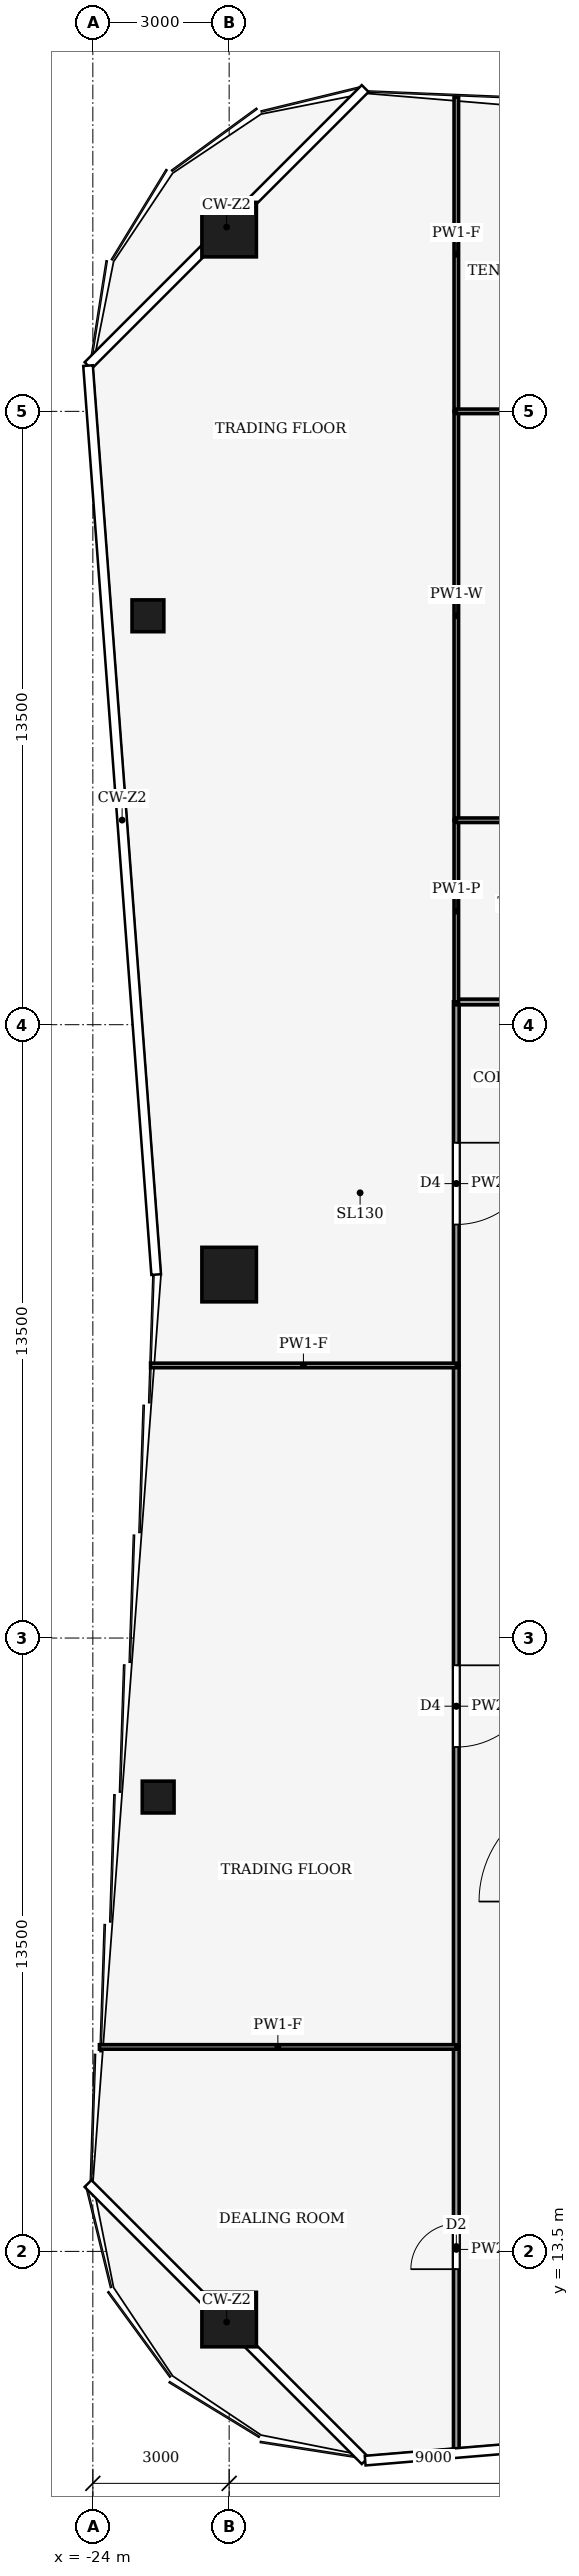
"""IFC4 building model, lengths in metres.
Left out: names, types, materials, properties, quantities, classifications, styles, units other than length and angle.
Written with IfcOpenShell. Run it as: python <this file> out.ifc"""

import sys

from ifc_helpers import new_model, si_unit, direction, frame, frame_2d, origin, origin_2d, place, context, subcontext, project, spatial, rectangle, hollow_rectangle, extrude, element, fill, save


model = new_model("IFC4")
c1 = context("Model", 3, precision=1e-05, world=origin(), true_north=direction((0.0, 1.0)))
c2 = subcontext(c1, "Body", "Model", "MODEL_VIEW")
j1 = project(units=[si_unit("LENGTHUNIT", "METRE"), si_unit("PLANEANGLEUNIT", "RADIAN")], contexts=[c1])
p1 = place(None, origin())
s1 = spatial("IfcSite", under=j1, at=p1, CompositionType="ELEMENT")
p2 = place(p1, origin())
s2 = spatial("IfcBuilding", under=s1, at=p2, CompositionType="ELEMENT")
p3 = place(p2, frame((0.0, 0.0, 142.0)))
s3 = spatial("IfcBuildingStorey", under=s2, at=p3, CompositionType="ELEMENT", Elevation=142.0)
for number, where, z_axis, x_axis in (
    (1, (-21.0, 58.0, 0.0), (0.0, 0.0, 1.0), (1.0, 0.0, 0.0)),
    (2, (-21.0, 12.0, 0.0), (0.0, 0.0, 1.0), (1.0, 0.0, 0.0)),
    (3, (-21.0, 35.0, 0.0), (0.0, 0.0, 1.0), (1.0, 0.0, 0.0)),
):
    element("IfcColumn", number, at=place(p3, frame(where, z_axis=z_axis, x_axis=x_axis)), inside=s3, PredefinedType="COLUMN", context=c2, shape_type="SweptSolid", body=[
        extrude(hollow_rectangle(XDim=1.2, YDim=1.2, WallThickness=0.07, at=origin_2d()), origin(), (0.0, 0.0, 1.0), 4.0),
    ])
for number, where, z_axis, x_axis in (
    (4, (-22.562, 23.5, 0.0), (0.0, 0.0, 1.0), (1.0, 0.0, 0.0)),
    (5, (-22.788, 49.5, 0.0), (0.0, 0.0, 1.0), (1.0, 0.0, 0.0)),
):
    element("IfcColumn", number, at=place(p3, frame(where, z_axis=z_axis, x_axis=x_axis)), inside=s3, PredefinedType="COLUMN", context=c2, shape_type="SweptSolid", body=[
        extrude(hollow_rectangle(XDim=0.7, YDim=0.7, WallThickness=0.03, at=origin_2d()), origin(), (0.0, 0.0, 1.0), 4.0),
    ])
p4 = place(p3, frame((-16.0, 9.087, 0.0), z_axis=(0.0, 0.0, 1.0), x_axis=(0.0, 1.0, 0.0)))
e6 = element("IfcWall", 6, at=p4, inside=s3, PredefinedType="PARTITIONING", context=c2, shape_type="SweptSolid", body=[
    extrude(rectangle(XDim=8.913, YDim=0.125, at=frame_2d((4.457, 0.0))), origin(), (0.0, 0.0, 1.0), 3.04),
])
p5 = place(p4, frame((4.022, 0.0, 0.0)))
e7 = element("IfcOpeningElement", 7, at=p5, cuts=e6, PredefinedType="OPENING", context=c2, shape_type="SweptSolid", body=[
    extrude(rectangle(XDim=1.0, YDim=2.1, at=frame_2d((0.5, 1.05))), frame((0.0, 0.073, 0.0), z_axis=(0.0, -1.0, 0.0), x_axis=(1.0, 0.0, 0.0)), (0.0, 0.0, 1.0), 0.145),
])
p6 = place(p3, frame((-16.0, 33.0, 0.0), z_axis=(0.0, 0.0, 1.0), x_axis=(0.0, -1.0, 0.0)))
e8 = element("IfcWall", 8, at=p6, inside=s3, PredefinedType="PARTITIONING", context=c2, shape_type="SweptSolid", body=[
    extrude(rectangle(XDim=15.0, YDim=0.125, at=frame_2d((7.5, 0.0))), origin(), (0.0, 0.0, 1.0), 3.48),
])
p7 = place(p6, frame((6.6, 0.0, 0.0)))
e9 = element("IfcOpeningElement", 9, at=p7, cuts=e8, PredefinedType="OPENING", context=c2, shape_type="SweptSolid", body=[
    extrude(rectangle(XDim=1.8, YDim=2.1, at=frame_2d((0.9, 1.05))), frame((0.0, 0.073, 0.0), z_axis=(0.0, -1.0, 0.0), x_axis=(1.0, 0.0, 0.0)), (0.0, 0.0, 1.0), 0.145),
])
p8 = place(p3, frame((-16.0, 41.004, 0.0), z_axis=(0.0, 0.0, 1.0), x_axis=(0.0, -1.0, 0.0)))
e10 = element("IfcWall", 10, at=p8, inside=s3, PredefinedType="PARTITIONING", context=c2, shape_type="SweptSolid", body=[
    extrude(rectangle(XDim=8.004, YDim=0.125, at=frame_2d((4.002, 0.0))), origin(), (0.0, 0.0, 1.0), 3.14),
])
p9 = place(p8, frame((3.102, 0.0, 0.0)))
e11 = element("IfcOpeningElement", 11, at=p9, cuts=e10, PredefinedType="OPENING", context=c2, shape_type="SweptSolid", body=[
    extrude(rectangle(XDim=1.8, YDim=2.1, at=frame_2d((0.9, 1.05))), frame((0.0, 0.073, 0.0), z_axis=(0.0, -1.0, 0.0), x_axis=(1.0, 0.0, 0.0)), (0.0, 0.0, 1.0), 0.145),
])
p10 = place(p3, frame((-16.0, 41.0, 0.0), z_axis=(0.0, 0.0, 1.0), x_axis=(1.0, 0.0, 0.0)))
e12 = element("IfcWall", 12, at=p10, inside=s3, PredefinedType="PARTITIONING", context=c2, shape_type="SweptSolid", body=[
    extrude(rectangle(XDim=4.0, YDim=0.125, at=frame_2d((2.0, 0.0))), origin(), (0.0, 0.0, 1.0), 3.44),
])
p11 = place(p10, frame((1.5, 0.0, 0.0)))
e13 = element("IfcOpeningElement", 13, at=p11, cuts=e12, PredefinedType="OPENING", context=c2, shape_type="SweptSolid", body=[
    extrude(rectangle(XDim=1.0, YDim=2.1, at=frame_2d((0.5, 1.05))), frame((0.0, 0.073, 0.0), z_axis=(0.0, -1.0, 0.0), x_axis=(1.0, 0.0, 0.0)), (0.0, 0.0, 1.0), 0.145),
])
p12 = place(p3, frame((-16.0, 18.0, 0.0), z_axis=(0.0, 0.0, 1.0), x_axis=(-1.0, 0.0, 0.0)))
e14 = element("IfcWall", 14, at=p12, inside=s3, PredefinedType="PARTITIONING", context=c2, shape_type="SweptSolid", body=[
    extrude(rectangle(XDim=7.855, YDim=0.1, at=frame_2d((3.927, 0.0))), origin(), (0.0, 0.0, 1.0), 3.04),
])
p13 = place(p3, frame((-16.0, 33.0, 0.0), z_axis=(0.0, 0.0, 1.0), x_axis=(-1.0, 0.0, 0.0)))
e15 = element("IfcWall", 15, at=p13, inside=s3, PredefinedType="PARTITIONING", context=c2, shape_type="SweptSolid", body=[
    extrude(rectangle(XDim=6.73, YDim=0.1, at=frame_2d((3.365, 0.0))), origin(), (0.0, 0.0, 1.0), 3.04),
])
p14 = place(p3, frame((-16.0, 41.0, 0.0), z_axis=(0.0, 0.0, 1.0), x_axis=(0.0, 1.0, 0.0)))
e16 = element("IfcWall", 16, at=p14, inside=s3, PredefinedType="PARTITIONING", context=c2, shape_type="SweptSolid", body=[
    extrude(rectangle(XDim=4.0, YDim=0.1, at=frame_2d((2.0, 0.0))), origin(), (0.0, 0.0, 1.0), 3.44),
])
p15 = place(p3, frame((-16.0, 45.0, 0.0), z_axis=(0.0, 0.0, 1.0), x_axis=(0.0, 1.0, 0.0)))
e17 = element("IfcWall", 17, at=p15, inside=s3, PredefinedType="PARTITIONING", context=c2, shape_type="SweptSolid", body=[
    extrude(rectangle(XDim=9.0, YDim=0.1, at=frame_2d((4.5, 0.0))), origin(), (0.0, 0.0, 1.0), 3.24),
])
p16 = place(p3, frame((-16.0, 54.0, 0.0), z_axis=(0.0, 0.0, 1.0), x_axis=(0.0, 1.0, 0.0)))
e18 = element("IfcWall", 18, at=p16, inside=s3, PredefinedType="PARTITIONING", context=c2, shape_type="SweptSolid", body=[
    extrude(rectangle(XDim=6.913, YDim=0.1, at=frame_2d((3.457, 0.0))), origin(), (0.0, 0.0, 1.0), 3.04),
])
p17 = place(p3, frame((-11.996, 45.0, 0.0), z_axis=(0.0, 0.0, 1.0), x_axis=(-1.0, 0.0, 0.0)))
e19 = element("IfcWall", 19, at=p17, inside=s3, PredefinedType="PARTITIONING", context=c2, shape_type="SweptSolid", body=[
    extrude(rectangle(XDim=4.004, YDim=0.1, at=frame_2d((2.002, 0.0))), origin(), (0.0, 0.0, 1.0), 3.87),
])
p18 = place(p3, frame((-16.0, 54.0, 0.0), z_axis=(0.0, 0.0, 1.0), x_axis=(1.0, 0.0, 0.0)))
e20 = element("IfcWall", 20, at=p18, inside=s3, PredefinedType="PARTITIONING", context=c2, shape_type="SweptSolid", body=[
    extrude(rectangle(XDim=4.0, YDim=0.1, at=frame_2d((2.0, 0.0))), origin(), (0.0, 0.0, 1.0), 3.87),
])
p19 = place(p18, frame((1.5, 0.0, 0.0)))
e21 = element("IfcOpeningElement", 21, at=p19, cuts=e20, PredefinedType="OPENING", context=c2, shape_type="SweptSolid", body=[
    extrude(rectangle(XDim=1.0, YDim=2.1, at=frame_2d((0.5, 1.05))), frame((0.0, 0.06, 0.0), z_axis=(0.0, -1.0, 0.0), x_axis=(1.0, 0.0, 0.0)), (0.0, 0.0, 1.0), 0.12),
])
p20 = place(p5, origin())
e22 = element("IfcDoor", 22, at=p20, inside=s3, OperationType="SINGLE_SWING_RIGHT", PredefinedType="DOOR", context=c2, shape_type="SweptSolid", body=[
    extrude(rectangle(XDim=1.0, YDim=2.1, at=frame_2d((0.5, 1.05))), frame((0.0, 0.025, 0.0), z_axis=(0.0, -1.0, 0.0), x_axis=(1.0, 0.0, 0.0)), (0.0, 0.0, 1.0), 0.05),
])
fill(e7, e22)
p21 = place(p7, origin())
e23 = element("IfcDoor", 23, at=p21, inside=s3, OperationType="DOUBLE_DOOR_SINGLE_SWING", PredefinedType="DOOR", context=c2, shape_type="SweptSolid", body=[
    extrude(rectangle(XDim=1.8, YDim=2.1, at=frame_2d((0.9, 1.05))), frame((0.0, 0.025, 0.0), z_axis=(0.0, -1.0, 0.0), x_axis=(1.0, 0.0, 0.0)), (0.0, 0.0, 1.0), 0.05),
])
fill(e9, e23)
p22 = place(p9, origin())
e24 = element("IfcDoor", 24, at=p22, inside=s3, OperationType="DOUBLE_DOOR_SINGLE_SWING", PredefinedType="DOOR", context=c2, shape_type="SweptSolid", body=[
    extrude(rectangle(XDim=1.8, YDim=2.1, at=frame_2d((0.9, 1.05))), frame((0.0, 0.025, 0.0), z_axis=(0.0, -1.0, 0.0), x_axis=(1.0, 0.0, 0.0)), (0.0, 0.0, 1.0), 0.05),
])
fill(e11, e24)
save(model, sys.argv[1])
